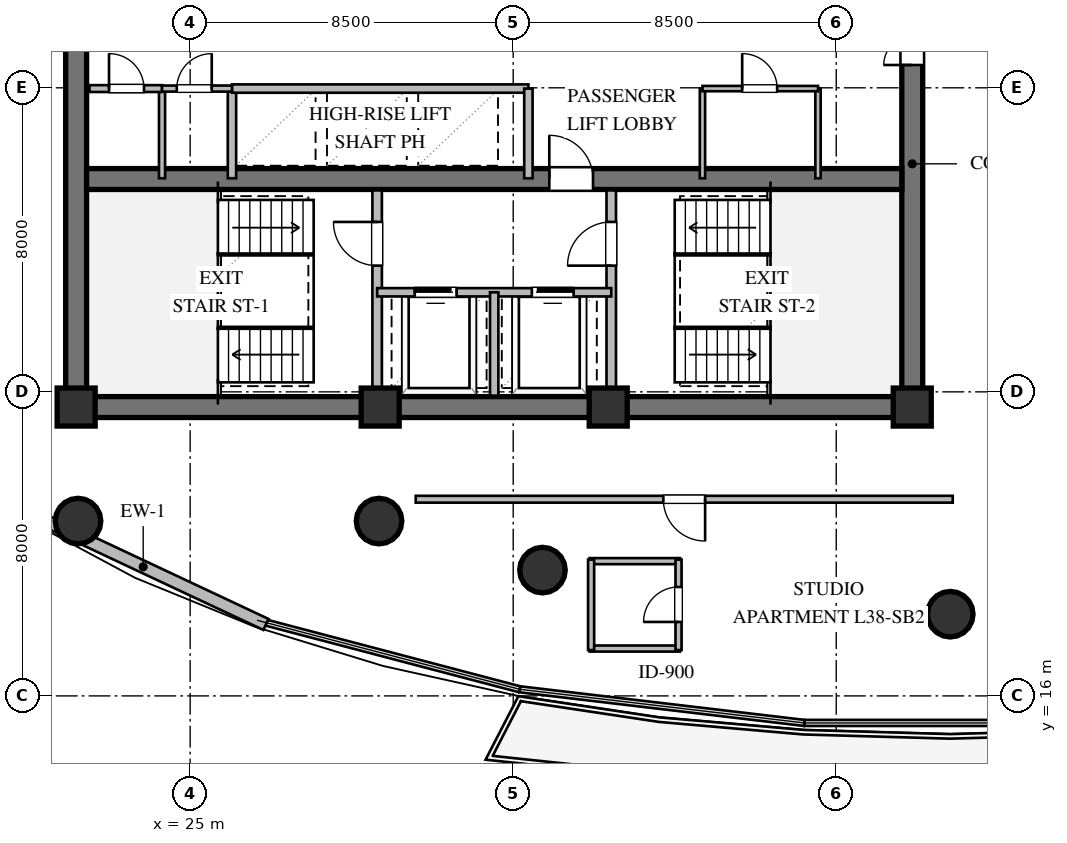
"""IFC4 building model, lengths in metres.
Left out: names, types, materials, properties, quantities, classifications, styles, units other than length and angle.
Written with IfcOpenShell. Run it as: python <this file> out.ifc"""

import sys

from ifc_helpers import new_model, si_unit, direction, frame, frame_2d, origin, origin_2d, place, context, subcontext, project, spatial, rectangle, circle, extrude, element, fill, save


model = new_model("IFC4")
c1 = context("Model", 3, precision=1e-05, world=origin(), true_north=direction((0.0, 1.0)))
c2 = subcontext(c1, "Body", "Model", "MODEL_VIEW")
j1 = project(units=[si_unit("LENGTHUNIT", "METRE"), si_unit("PLANEANGLEUNIT", "RADIAN")], contexts=[c1])
p1 = place(None, origin())
s1 = spatial("IfcSite", under=j1, at=p1, CompositionType="ELEMENT")
p2 = place(p1, origin())
s2 = spatial("IfcBuilding", under=s1, at=p2, CompositionType="ELEMENT")
p3 = place(p2, frame((0.0, 0.0, 145.8)))
s3 = spatial("IfcBuildingStorey", under=s2, at=p3, CompositionType="ELEMENT", Elevation=145.8)
p4 = place(p3, frame((21.725, 23.6, 0.0), z_axis=(0.0, 0.0, 1.0), x_axis=(1.0, 0.0, 0.0)))
e1 = element("IfcWall", 1, at=p4, inside=s3, PredefinedType="SHEAR", context=c2, shape_type="SweptSolid", body=[
    extrude(rectangle(XDim=22.55, YDim=0.55, at=frame_2d((11.275, 0.0))), origin(), (0.0, 0.0, 1.0), 3.36),
])
p5 = place(p3, frame((22.0, 23.875, 0.0), z_axis=(0.0, 0.0, 1.0), x_axis=(0.0, 1.0, 0.0)))
e2 = element("IfcWall", 2, at=p5, inside=s3, PredefinedType="SHEAR", context=c2, shape_type="SweptSolid", body=[
    extrude(rectangle(XDim=12.25, YDim=0.55, at=frame_2d((6.125, 0.0))), origin(), (0.0, 0.0, 1.0), 3.36),
])
p6 = place(p3, frame((44.0, 23.875, 0.0), z_axis=(0.0, 0.0, 1.0), x_axis=(0.0, 1.0, 0.0)))
e3 = element("IfcWall", 3, at=p6, inside=s3, PredefinedType="SHEAR", context=c2, shape_type="SweptSolid", body=[
    extrude(rectangle(XDim=12.25, YDim=0.55, at=frame_2d((6.125, 0.0))), origin(), (0.0, 0.0, 1.0), 3.36),
])
p7 = place(p6, frame((8.725, 0.0, 0.0)))
e4 = element("IfcOpeningElement", 4, at=p7, cuts=e3, PredefinedType="OPENING", context=c2, shape_type="SweptSolid", body=[
    extrude(rectangle(XDim=1.5, YDim=2.15, at=frame_2d((0.75, 1.075))), frame((0.0, 0.285, 0.0), z_axis=(0.0, -1.0, 0.0), x_axis=(1.0, 0.0, 0.0)), (0.0, 0.0, 1.0), 0.57),
])
p8 = place(p3, frame((22.275, 29.6, 0.0), z_axis=(0.0, 0.0, 1.0), x_axis=(1.0, 0.0, 0.0)))
e5 = element("IfcWall", 5, at=p8, inside=s3, PredefinedType="SHEAR", context=c2, shape_type="SweptSolid", body=[
    extrude(rectangle(XDim=21.45, YDim=0.55, at=frame_2d((10.725, 0.0))), origin(), (0.0, 0.0, 1.0), 3.36),
])
p9 = place(p8, frame((12.175, 0.0, 0.0)))
e6 = element("IfcOpeningElement", 6, at=p9, cuts=e5, PredefinedType="OPENING", context=c2, shape_type="SweptSolid", body=[
    extrude(rectangle(XDim=1.15, YDim=2.1, at=frame_2d((0.575, 1.05))), frame((0.0, 0.285, 0.0), z_axis=(0.0, -1.0, 0.0), x_axis=(1.0, 0.0, 0.0)), (0.0, 0.0, 1.0), 0.57),
])
for number, where, z_axis, x_axis in (
    (7, (22.0, 23.6, 0.0), (0.0, 0.0, 1.0), (1.0, 0.0, 0.0)),
    (8, (30.0, 23.6, 0.0), (0.0, 0.0, 1.0), (1.0, 0.0, 0.0)),
    (9, (36.0, 23.6, 0.0), (0.0, 0.0, 1.0), (1.0, 0.0, 0.0)),
    (10, (44.0, 23.6, 0.0), (0.0, 0.0, 1.0), (1.0, 0.0, 0.0)),
):
    element("IfcColumn", number, at=place(p3, frame(where, z_axis=z_axis, x_axis=x_axis)), inside=s3, PredefinedType="COLUMN", context=c2, shape_type="SweptSolid", body=[
        extrude(rectangle(XDim=1.0, YDim=1.0, at=origin_2d()), origin(), (0.0, 0.0, 1.0), 3.6),
    ])
for number, where, z_axis, x_axis in (
    (11, (22.05, 20.6, 0.0), (0.0, 0.0, 1.0), (1.0, 0.0, 0.0)),
    (12, (29.97, 20.6, 0.0), (0.0, 0.0, 1.0), (1.0, 0.0, 0.0)),
    (13, (34.27, 19.31, 0.0), (0.0, 0.0, 1.0), (1.0, 0.0, 0.0)),
    (14, (45.0, 18.15, 0.0), (0.0, 0.0, 1.0), (1.0, 0.0, 0.0)),
):
    element("IfcColumn", number, at=place(p3, frame(where, z_axis=z_axis, x_axis=x_axis)), inside=s3, PredefinedType="COLUMN", context=c2, shape_type="SweptSolid", body=[
        extrude(circle(Radius=0.6, at=origin_2d()), origin(), (0.0, 0.0, 1.0), 3.6),
    ])
p10 = place(p3, frame((26.994, 17.88, 0.0), z_axis=(0.0, 0.0, 1.0), x_axis=(-0.905106920297, 0.425184034073, 0.0)))
e15 = element("IfcWall", 15, at=p10, inside=s3, PredefinedType="STANDARD", context=c2, shape_type="SweptSolid", body=[
    extrude(rectangle(XDim=7.136, YDim=0.32, at=frame_2d((3.568, 0.0))), origin(), (0.0, 0.0, 1.0), 2.657),
])
p11 = place(p3, frame((29.92, 23.9, 0.0), z_axis=(0.0, 0.0, 1.0), x_axis=(0.0, 1.0, 0.0)))
e16 = element("IfcWall", 16, at=p11, inside=s3, PredefinedType="SOLIDWALL", context=c2, shape_type="SweptSolid", body=[
    extrude(rectangle(XDim=5.4, YDim=0.25, at=frame_2d((2.7, 0.0))), origin(), (0.0, 0.0, 1.0), 2.806),
])
p12 = place(p11, frame((3.421, 0.0, 0.0)))
e17 = element("IfcOpeningElement", 17, at=p12, cuts=e16, PredefinedType="OPENING", context=c2, shape_type="SweptSolid", body=[
    extrude(rectangle(XDim=1.15, YDim=2.1, at=frame_2d((0.575, 1.05))), frame((0.0, 0.135, 0.0), z_axis=(0.0, -1.0, 0.0), x_axis=(1.0, 0.0, 0.0)), (0.0, 0.0, 1.0), 0.27),
])
p13 = place(p3, frame((36.08, 23.9, 0.0), z_axis=(0.0, 0.0, 1.0), x_axis=(0.0, 1.0, 0.0)))
e18 = element("IfcWall", 18, at=p13, inside=s3, PredefinedType="SOLIDWALL", context=c2, shape_type="SweptSolid", body=[
    extrude(rectangle(XDim=5.4, YDim=0.25, at=frame_2d((2.7, 0.0))), origin(), (0.0, 0.0, 1.0), 3.36),
])
p14 = place(p13, frame((3.421, 0.0, 0.0)))
e19 = element("IfcOpeningElement", 19, at=p14, cuts=e18, PredefinedType="OPENING", context=c2, shape_type="SweptSolid", body=[
    extrude(rectangle(XDim=1.15, YDim=2.1, at=frame_2d((0.575, 1.05))), frame((0.0, 0.135, 0.0), z_axis=(0.0, -1.0, 0.0), x_axis=(1.0, 0.0, 0.0)), (0.0, 0.0, 1.0), 0.27),
])
p15 = place(p3, frame((29.92, 26.62, 0.0), z_axis=(0.0, 0.0, 1.0), x_axis=(1.0, 0.0, 0.0)))
e20 = element("IfcWall", 20, at=p15, inside=s3, PredefinedType="SOLIDWALL", context=c2, shape_type="SweptSolid", body=[
    extrude(rectangle(XDim=6.16, YDim=0.22, at=frame_2d((3.08, 0.0))), origin(), (0.0, 0.0, 1.0), 3.36),
])
p16 = place(p15, frame((0.99, 0.0, 0.0)))
e21 = element("IfcOpeningElement", 21, at=p16, cuts=e20, PredefinedType="OPENING", context=c2, shape_type="SweptSolid", body=[
    extrude(rectangle(XDim=1.1, YDim=2.1, at=frame_2d((0.55, 1.05))), frame((0.0, 0.12, 0.0), z_axis=(0.0, -1.0, 0.0), x_axis=(1.0, 0.0, 0.0)), (0.0, 0.0, 1.0), 0.24),
])
p17 = place(p15, frame((4.07, 0.0, 0.0)))
e22 = element("IfcOpeningElement", 22, at=p17, cuts=e20, PredefinedType="OPENING", context=c2, shape_type="SweptSolid", body=[
    extrude(rectangle(XDim=1.1, YDim=2.1, at=frame_2d((0.55, 1.05))), frame((0.0, 0.12, 0.0), z_axis=(0.0, -1.0, 0.0), x_axis=(1.0, 0.0, 0.0)), (0.0, 0.0, 1.0), 0.24),
])
p18 = place(p3, frame((33.0, 23.9, 0.0), z_axis=(0.0, 0.0, 1.0), x_axis=(0.0, 1.0, 0.0)))
e23 = element("IfcWall", 23, at=p18, inside=s3, PredefinedType="SOLIDWALL", context=c2, shape_type="SweptSolid", body=[
    extrude(rectangle(XDim=2.72, YDim=0.22, at=frame_2d((1.36, 0.0))), origin(), (0.0, 0.0, 1.0), 3.36),
])
p19 = place(p3, frame((26.1, 29.62, 0.0), z_axis=(0.0, 0.0, 1.0), x_axis=(0.0, 1.0, 0.0)))
e24 = element("IfcWall", 24, at=p19, inside=s3, PredefinedType="SOLIDWALL", context=c2, shape_type="SweptSolid", body=[
    extrude(rectangle(XDim=2.36, YDim=0.22, at=frame_2d((1.18, 0.0))), origin(), (0.0, 0.0, 1.0), 3.36),
])
p20 = place(p3, frame((26.1, 31.98, 0.0), z_axis=(0.0, 0.0, 1.0), x_axis=(1.0, 0.0, 0.0)))
e25 = element("IfcWall", 25, at=p20, inside=s3, PredefinedType="SOLIDWALL", context=c2, shape_type="SweptSolid", body=[
    extrude(rectangle(XDim=7.8, YDim=0.22, at=frame_2d((3.9, 0.0))), origin(), (0.0, 0.0, 1.0), 3.36),
])
p21 = place(p3, frame((33.9, 29.62, 0.0), z_axis=(0.0, 0.0, 1.0), x_axis=(0.0, 1.0, 0.0)))
e26 = element("IfcWall", 26, at=p21, inside=s3, PredefinedType="SOLIDWALL", context=c2, shape_type="SweptSolid", body=[
    extrude(rectangle(XDim=2.36, YDim=0.22, at=frame_2d((1.18, 0.0))), origin(), (0.0, 0.0, 1.0), 3.36),
])
p22 = place(p3, frame((24.26, 29.62, 0.0), z_axis=(0.0, 0.0, 1.0), x_axis=(0.0, 1.0, 0.0)))
e27 = element("IfcWall", 27, at=p22, inside=s3, PredefinedType="PLUMBINGWALL", context=c2, shape_type="SweptSolid", body=[
    extrude(rectangle(XDim=2.36, YDim=0.16, at=frame_2d((1.18, 0.0))), origin(), (0.0, 0.0, 1.0), 3.36),
])
p23 = place(p3, frame((22.35, 31.98, 0.0), z_axis=(0.0, 0.0, 1.0), x_axis=(1.0, 0.0, 0.0)))
e28 = element("IfcWall", 28, at=p23, inside=s3, PredefinedType="PARTITIONING", context=c2, shape_type="SweptSolid", body=[
    extrude(rectangle(XDim=1.91, YDim=0.18, at=frame_2d((0.955, 0.0))), origin(), (0.0, 0.0, 1.0), 3.36),
])
p24 = place(p23, frame((0.515, 0.0, 0.0)))
e29 = element("IfcOpeningElement", 29, at=p24, cuts=e28, PredefinedType="OPENING", context=c2, shape_type="SweptSolid", body=[
    extrude(rectangle(XDim=0.92, YDim=2.1, at=frame_2d((0.46, 1.05))), frame((0.0, 0.1, 0.0), z_axis=(0.0, -1.0, 0.0), x_axis=(1.0, 0.0, 0.0)), (0.0, 0.0, 1.0), 0.2),
])
p25 = place(p3, frame((24.26, 31.98, 0.0), z_axis=(0.0, 0.0, 1.0), x_axis=(1.0, 0.0, 0.0)))
e30 = element("IfcWall", 30, at=p25, inside=s3, PredefinedType="PLUMBINGWALL", context=c2, shape_type="SweptSolid", body=[
    extrude(rectangle(XDim=1.84, YDim=0.16, at=frame_2d((0.92, 0.0))), origin(), (0.0, 0.0, 1.0), 3.36),
])
p26 = place(p25, frame((0.388, 0.0, 0.0)))
e31 = element("IfcOpeningElement", 31, at=p26, cuts=e30, PredefinedType="OPENING", context=c2, shape_type="SweptSolid", body=[
    extrude(rectangle(XDim=0.92, YDim=2.1, at=frame_2d((0.46, 1.05))), frame((0.0, 0.09, 0.0), z_axis=(0.0, -1.0, 0.0), x_axis=(1.0, 0.0, 0.0)), (0.0, 0.0, 1.0), 0.18),
])
for number, where, z_axis, x_axis in (
    (32, (38.48, 29.62, 0.0), (0.0, 0.0, 1.0), (0.0, 1.0, 0.0)),
    (33, (41.52, 29.62, 0.0), (0.0, 0.0, 1.0), (0.0, 1.0, 0.0)),
):
    element("IfcWall", number, at=place(p3, frame(where, z_axis=z_axis, x_axis=x_axis)), inside=s3, PredefinedType="PARTITIONING", context=c2, shape_type="SweptSolid", body=[
        extrude(rectangle(XDim=2.36, YDim=0.14, at=frame_2d((1.18, 0.0))), origin(), (0.0, 0.0, 1.0), 3.36),
    ])
p27 = place(p3, frame((38.48, 31.98, 0.0), z_axis=(0.0, 0.0, 1.0), x_axis=(1.0, 0.0, 0.0)))
e34 = element("IfcWall", 34, at=p27, inside=s3, PredefinedType="PARTITIONING", context=c2, shape_type="SweptSolid", body=[
    extrude(rectangle(XDim=3.04, YDim=0.14, at=frame_2d((1.52, 0.0))), origin(), (0.0, 0.0, 1.0), 3.36),
])
p28 = place(p27, frame((1.045, 0.0, 0.0)))
e35 = element("IfcOpeningElement", 35, at=p28, cuts=e34, PredefinedType="OPENING", context=c2, shape_type="SweptSolid", body=[
    extrude(rectangle(XDim=0.92, YDim=2.1, at=frame_2d((0.46, 1.05))), frame((0.0, 0.08, 0.0), z_axis=(0.0, -1.0, 0.0), x_axis=(1.0, 0.0, 0.0)), (0.0, 0.0, 1.0), 0.16),
])
p29 = place(p3, frame((35.51, 17.246, 0.0), z_axis=(0.0, 0.0, 1.0), x_axis=(1.0, 0.0, 0.0)))
e36 = element("IfcWall", 36, at=p29, inside=s3, PredefinedType="PLUMBINGWALL", context=c2, shape_type="SweptSolid", body=[
    extrude(rectangle(XDim=2.38, YDim=0.16, at=frame_2d((1.19, 0.0))), origin(), (0.0, 0.0, 1.0), 3.36),
])
p30 = place(p3, frame((35.51, 19.546, 0.0), z_axis=(0.0, 0.0, 1.0), x_axis=(1.0, 0.0, 0.0)))
e37 = element("IfcWall", 37, at=p30, inside=s3, PredefinedType="PLUMBINGWALL", context=c2, shape_type="SweptSolid", body=[
    extrude(rectangle(XDim=2.38, YDim=0.16, at=frame_2d((1.19, 0.0))), origin(), (0.0, 0.0, 1.0), 2.657),
])
p31 = place(p3, frame((35.55, 17.206, 0.0), z_axis=(0.0, 0.0, 1.0), x_axis=(0.0, 1.0, 0.0)))
e38 = element("IfcWall", 38, at=p31, inside=s3, PredefinedType="PLUMBINGWALL", context=c2, shape_type="SweptSolid", body=[
    extrude(rectangle(XDim=2.38, YDim=0.16, at=frame_2d((1.19, 0.0))), origin(), (0.0, 0.0, 1.0), 3.36),
])
p32 = place(p3, frame((37.85, 17.206, 0.0), z_axis=(0.0, 0.0, 1.0), x_axis=(0.0, 1.0, 0.0)))
e39 = element("IfcWall", 39, at=p32, inside=s3, PredefinedType="PLUMBINGWALL", context=c2, shape_type="SweptSolid", body=[
    extrude(rectangle(XDim=2.38, YDim=0.16, at=frame_2d((1.19, 0.0))), origin(), (0.0, 0.0, 1.0), 3.36),
])
p33 = place(p32, frame((0.74, 0.0, 0.0)))
e40 = element("IfcOpeningElement", 40, at=p33, cuts=e39, PredefinedType="OPENING", context=c2, shape_type="SweptSolid", body=[
    extrude(rectangle(XDim=0.92, YDim=2.1, at=frame_2d((0.46, 1.05))), frame((0.0, 0.09, 0.0), z_axis=(0.0, -1.0, 0.0), x_axis=(1.0, 0.0, 0.0)), (0.0, 0.0, 1.0), 0.18),
])
p34 = place(p3, frame((45.065, 21.175, 0.0), z_axis=(0.0, 0.0, 1.0), x_axis=(-1.0, 0.0, 0.0)))
e41 = element("IfcWall", 41, at=p34, inside=s3, PredefinedType="PARTITIONING", context=c2, shape_type="SweptSolid", body=[
    extrude(rectangle(XDim=14.13, YDim=0.18, at=frame_2d((7.065, 0.0))), origin(), (0.0, 0.0, 1.0), 2.996),
])
p35 = place(p34, frame((6.515, 0.0, 0.0)))
e42 = element("IfcOpeningElement", 42, at=p35, cuts=e41, PredefinedType="OPENING", context=c2, shape_type="SweptSolid", body=[
    extrude(rectangle(XDim=1.1, YDim=2.1, at=frame_2d((0.55, 1.05))), frame((0.0, 0.1, 0.0), z_axis=(0.0, -1.0, 0.0), x_axis=(1.0, 0.0, 0.0)), (0.0, 0.0, 1.0), 0.2),
])
p36 = place(p12, origin())
e43 = element("IfcDoor", 43, at=p36, inside=s3, OperationType="SINGLE_SWING_RIGHT", PredefinedType="DOOR", context=c2, shape_type="SweptSolid", body=[
    extrude(rectangle(XDim=1.15, YDim=2.1, at=frame_2d((0.575, 1.05))), frame((0.0, 0.025, 0.0), z_axis=(0.0, -1.0, 0.0), x_axis=(1.0, 0.0, 0.0)), (0.0, 0.0, 1.0), 0.05),
])
fill(e17, e43)
p37 = place(p14, origin())
e44 = element("IfcDoor", 44, at=p37, inside=s3, OperationType="SINGLE_SWING_LEFT", PredefinedType="DOOR", context=c2, shape_type="SweptSolid", body=[
    extrude(rectangle(XDim=1.15, YDim=2.1, at=frame_2d((0.575, 1.05))), frame((0.0, 0.025, 0.0), z_axis=(0.0, -1.0, 0.0), x_axis=(1.0, 0.0, 0.0)), (0.0, 0.0, 1.0), 0.05),
])
fill(e19, e44)
p38 = place(p16, origin())
e45 = element("IfcDoor", 45, at=p38, inside=s3, OperationType="SLIDING_TO_LEFT", PredefinedType="DOOR", context=c2, shape_type="SweptSolid", body=[
    extrude(rectangle(XDim=1.1, YDim=2.1, at=frame_2d((0.55, 1.05))), frame((0.0, 0.025, 0.0), z_axis=(0.0, -1.0, 0.0), x_axis=(1.0, 0.0, 0.0)), (0.0, 0.0, 1.0), 0.05),
])
fill(e21, e45)
p39 = place(p17, origin())
e46 = element("IfcDoor", 46, at=p39, inside=s3, OperationType="SLIDING_TO_RIGHT", PredefinedType="DOOR", context=c2, shape_type="SweptSolid", body=[
    extrude(rectangle(XDim=1.1, YDim=2.1, at=frame_2d((0.55, 1.05))), frame((0.0, 0.025, 0.0), z_axis=(0.0, -1.0, 0.0), x_axis=(1.0, 0.0, 0.0)), (0.0, 0.0, 1.0), 0.05),
])
fill(e22, e46)
p40 = place(p9, origin())
e47 = element("IfcDoor", 47, at=p40, inside=s3, OperationType="SINGLE_SWING_LEFT", PredefinedType="DOOR", context=c2, shape_type="SweptSolid", body=[
    extrude(rectangle(XDim=1.15, YDim=2.1, at=frame_2d((0.575, 1.05))), frame((0.0, 0.025, 0.0), z_axis=(0.0, -1.0, 0.0), x_axis=(1.0, 0.0, 0.0)), (0.0, 0.0, 1.0), 0.05),
])
fill(e6, e47)
p41 = place(p7, origin())
e48 = element("IfcDoor", 48, at=p41, inside=s3, OperationType="DOUBLE_DOOR_SINGLE_SWING", PredefinedType="DOOR", context=c2, shape_type="SweptSolid", body=[
    extrude(rectangle(XDim=1.5, YDim=2.15, at=frame_2d((0.75, 1.075))), frame((0.0, 0.025, 0.0), z_axis=(0.0, -1.0, 0.0), x_axis=(1.0, 0.0, 0.0)), (0.0, 0.0, 1.0), 0.05),
])
fill(e4, e48)
p42 = place(p24, origin())
e49 = element("IfcDoor", 49, at=p42, inside=s3, OperationType="SINGLE_SWING_LEFT", PredefinedType="DOOR", context=c2, shape_type="SweptSolid", body=[
    extrude(rectangle(XDim=0.92, YDim=2.1, at=frame_2d((0.46, 1.05))), frame((0.0, 0.025, 0.0), z_axis=(0.0, -1.0, 0.0), x_axis=(1.0, 0.0, 0.0)), (0.0, 0.0, 1.0), 0.05),
])
fill(e29, e49)
p43 = place(p26, origin())
e50 = element("IfcDoor", 50, at=p43, inside=s3, OperationType="SINGLE_SWING_RIGHT", PredefinedType="DOOR", context=c2, shape_type="SweptSolid", body=[
    extrude(rectangle(XDim=0.92, YDim=2.1, at=frame_2d((0.46, 1.05))), frame((0.0, 0.025, 0.0), z_axis=(0.0, -1.0, 0.0), x_axis=(1.0, 0.0, 0.0)), (0.0, 0.0, 1.0), 0.05),
])
fill(e31, e50)
p44 = place(p28, origin())
e51 = element("IfcDoor", 51, at=p44, inside=s3, OperationType="SINGLE_SWING_LEFT", PredefinedType="DOOR", context=c2, shape_type="SweptSolid", body=[
    extrude(rectangle(XDim=0.92, YDim=2.1, at=frame_2d((0.46, 1.05))), frame((0.0, 0.025, 0.0), z_axis=(0.0, -1.0, 0.0), x_axis=(1.0, 0.0, 0.0)), (0.0, 0.0, 1.0), 0.05),
])
fill(e35, e51)
p45 = place(p33, origin())
e52 = element("IfcDoor", 52, at=p45, inside=s3, OperationType="SINGLE_SWING_LEFT", PredefinedType="DOOR", context=c2, shape_type="SweptSolid", body=[
    extrude(rectangle(XDim=0.92, YDim=2.1, at=frame_2d((0.46, 1.05))), frame((0.0, 0.025, 0.0), z_axis=(0.0, -1.0, 0.0), x_axis=(1.0, 0.0, 0.0)), (0.0, 0.0, 1.0), 0.05),
])
fill(e40, e52)
p46 = place(p35, origin())
e53 = element("IfcDoor", 53, at=p46, inside=s3, OperationType="SINGLE_SWING_LEFT", PredefinedType="DOOR", context=c2, shape_type="SweptSolid", body=[
    extrude(rectangle(XDim=1.1, YDim=2.1, at=frame_2d((0.55, 1.05))), frame((0.0, 0.025, 0.0), z_axis=(0.0, -1.0, 0.0), x_axis=(1.0, 0.0, 0.0)), (0.0, 0.0, 1.0), 0.05),
])
fill(e42, e53)
save(model, sys.argv[1])
